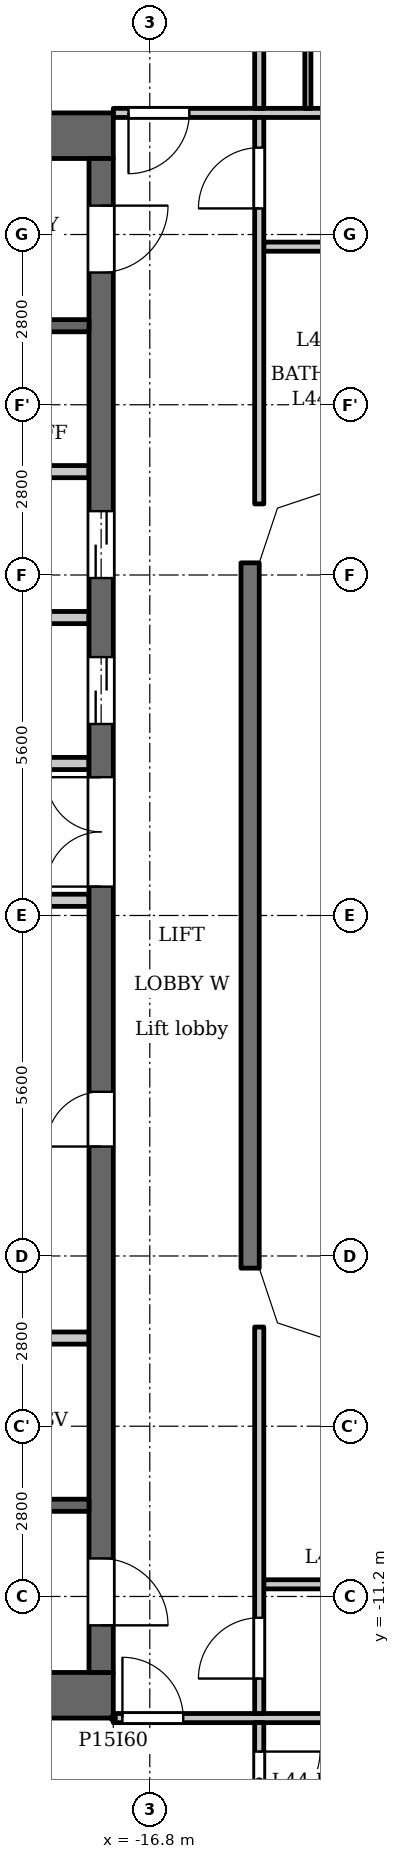
"""IFC4 building model, lengths in metres.
Left out: names, types, materials, properties, quantities, classifications, styles, units other than length and angle.
Written with IfcOpenShell. Run it as: python <this file> out.ifc"""

import sys

from ifc_helpers import new_model, si_unit, direction, frame, frame_2d, origin, place, context, subcontext, project, spatial, polyline, rectangle, outline, extrude, element, fill, save


model = new_model("IFC4")
c1 = context("Model", 3, precision=1e-05, world=origin(), true_north=direction((0.0, 1.0)))
c2 = subcontext(c1, "Body", "Model", "MODEL_VIEW")
j1 = project(units=[si_unit("LENGTHUNIT", "METRE"), si_unit("PLANEANGLEUNIT", "RADIAN")], contexts=[c1])
p1 = place(None, origin())
s1 = spatial("IfcSite", under=j1, at=p1, CompositionType="ELEMENT")
p2 = place(p1, origin())
s2 = spatial("IfcBuilding", under=s1, at=p2, CompositionType="ELEMENT")
p3 = place(p2, frame((0.0, 0.0, 171.1)))
s3 = spatial("IfcBuildingStorey", under=s2, at=p3, CompositionType="ELEMENT", Elevation=171.1)
p4 = place(p3, frame((-15.15, -5.8, 0.0), z_axis=(0.0, 0.0, 1.0), x_axis=(0.0, 1.0, 0.0)))
e1 = element("IfcWall", 1, at=p4, inside=s3, PredefinedType="SOLIDWALL", context=c2, shape_type="SweptSolid", body=[
    extrude(rectangle(XDim=11.6, YDim=0.3, at=frame_2d((5.8, 0.0))), origin(), (0.0, 0.0, 1.0), 3.2),
])
for number, where, z_axis, x_axis in (
    (2, (-17.4, 12.825, 0.0), (0.0, 0.0, 1.0), (-1.0, 0.0, 0.0)),
    (3, (-17.4, -12.825, 0.0), (0.0, 0.0, 1.0), (-1.0, 0.0, 0.0)),
):
    element("IfcWall", number, at=place(p3, frame(where, z_axis=z_axis, x_axis=x_axis)), inside=s3, PredefinedType="SHEAR", context=c2, shape_type="SweptSolid", body=[
        extrude(rectangle(XDim=10.4, YDim=0.75, at=frame_2d((5.2, 0.0))), origin(), (0.0, 0.0, 1.0), 3.2),
    ])
p5 = place(p3, frame((-17.6, -12.45, 0.0), z_axis=(0.0, 0.0, 1.0), x_axis=(0.0, 1.0, 0.0)))
e4 = element("IfcWall", 4, at=p5, inside=s3, PredefinedType="SHEAR", context=c2, shape_type="SweptSolid", body=[
    extrude(rectangle(XDim=24.9, YDim=0.4, at=frame_2d((12.45, 0.0))), origin(), (0.0, 0.0, 1.0), 3.2),
])
p6 = place(p5, frame((8.65, 0.0, 0.0)))
e5 = element("IfcOpeningElement", 5, at=p6, cuts=e4, PredefinedType="OPENING", context=c2, shape_type="SweptSolid", body=[
    extrude(rectangle(XDim=0.9, YDim=2.1, at=frame_2d((0.45, 1.05))), frame((0.0, 0.21, 0.0), z_axis=(0.0, -1.0, 0.0), x_axis=(1.0, 0.0, 0.0)), (0.0, 0.0, 1.0), 0.42),
])
p7 = place(p5, frame((15.6, 0.0, 0.0)))
e6 = element("IfcOpeningElement", 6, at=p7, cuts=e4, PredefinedType="OPENING", context=c2, shape_type="SweptSolid", body=[
    extrude(rectangle(XDim=1.1, YDim=2.1, at=frame_2d((0.55, 1.05))), frame((0.0, 0.21, 0.0), z_axis=(0.0, -1.0, 0.0), x_axis=(1.0, 0.0, 0.0)), (0.0, 0.0, 1.0), 0.42),
])
p8 = place(p5, frame((18.0, 0.0, 0.0)))
e7 = element("IfcOpeningElement", 7, at=p8, cuts=e4, PredefinedType="OPENING", context=c2, shape_type="SweptSolid", body=[
    extrude(rectangle(XDim=1.1, YDim=2.1, at=frame_2d((0.55, 1.05))), frame((0.0, 0.21, 0.0), z_axis=(0.0, -1.0, 0.0), x_axis=(1.0, 0.0, 0.0)), (0.0, 0.0, 1.0), 0.42),
])
p9 = place(p5, frame((23.025, 0.0, 0.0)))
e8 = element("IfcOpeningElement", 8, at=p9, cuts=e4, PredefinedType="OPENING", context=c2, shape_type="SweptSolid", body=[
    extrude(rectangle(XDim=1.1, YDim=2.1, at=frame_2d((0.55, 1.05))), frame((0.0, 0.21, 0.0), z_axis=(0.0, -1.0, 0.0), x_axis=(1.0, 0.0, 0.0)), (0.0, 0.0, 1.0), 0.42),
])
p10 = place(p5, frame((0.775, 0.0, 0.0)))
e9 = element("IfcOpeningElement", 9, at=p10, cuts=e4, PredefinedType="OPENING", context=c2, shape_type="SweptSolid", body=[
    extrude(rectangle(XDim=1.1, YDim=2.1, at=frame_2d((0.55, 1.05))), frame((0.0, 0.21, 0.0), z_axis=(0.0, -1.0, 0.0), x_axis=(1.0, 0.0, 0.0)), (0.0, 0.0, 1.0), 0.42),
])
p11 = place(p5, frame((12.925, 0.0, 0.0)))
e10 = element("IfcOpeningElement", 10, at=p11, cuts=e4, PredefinedType="OPENING", context=c2, shape_type="SweptSolid", body=[
    extrude(rectangle(XDim=1.8, YDim=2.1, at=frame_2d((0.9, 1.05))), frame((0.0, 0.21, 0.0), z_axis=(0.0, -1.0, 0.0), x_axis=(1.0, 0.0, 0.0)), (0.0, 0.0, 1.0), 0.42),
])
p12 = place(p3, frame((-17.8, -9.7, 0.0), z_axis=(0.0, 0.0, 1.0), x_axis=(-1.0, 0.0, 0.0)))
e11 = element("IfcWall", 11, at=p12, inside=s3, PredefinedType="SHEAR", context=c2, shape_type="SweptSolid", body=[
    extrude(rectangle(XDim=8.45, YDim=0.2, at=frame_2d((4.225, 0.0))), origin(), (0.0, 0.0, 1.0), 3.2),
])
p13 = place(p12, frame((0.85, 0.0, 0.0)))
e12 = element("IfcOpeningElement", 12, at=p13, cuts=e11, PredefinedType="OPENING", context=c2, shape_type="SweptSolid", body=[
    extrude(rectangle(XDim=1.1, YDim=2.1, at=frame_2d((0.55, 1.05))), frame((0.0, 0.11, 0.0), z_axis=(0.0, -1.0, 0.0), x_axis=(1.0, 0.0, 0.0)), (0.0, 0.0, 1.0), 0.22),
])
p14 = place(p12, frame((3.75, 0.0, 0.0)))
e13 = element("IfcOpeningElement", 13, at=p14, cuts=e11, PredefinedType="OPENING", context=c2, shape_type="SweptSolid", body=[
    extrude(rectangle(XDim=1.1, YDim=2.1, at=frame_2d((0.55, 1.05))), frame((0.0, 0.11, 0.0), z_axis=(0.0, -1.0, 0.0), x_axis=(1.0, 0.0, 0.0)), (0.0, 0.0, 1.0), 0.22),
])
p15 = place(p3, frame((-17.8, -6.95, 0.0), z_axis=(0.0, 0.0, 1.0), x_axis=(-1.0, 0.0, 0.0)))
e14 = element("IfcWall", 14, at=p15, inside=s3, PredefinedType="PARTITIONING", context=c2, shape_type="SweptSolid", body=[
    extrude(rectangle(XDim=2.8, YDim=0.2, at=frame_2d((1.4, 0.0))), origin(), (0.0, 0.0, 1.0), 3.2),
])
p16 = place(p3, frame((-17.8, 0.25, 0.0), z_axis=(0.0, 0.0, 1.0), x_axis=(-1.0, 0.0, 0.0)))
e15 = element("IfcWall", 15, at=p16, inside=s3, PredefinedType="PARTITIONING", context=c2, shape_type="SweptSolid", body=[
    extrude(rectangle(XDim=3.0, YDim=0.2, at=frame_2d((1.5, 0.0))), origin(), (0.0, 0.0, 1.0), 3.2),
])
p17 = place(p16, frame((1.98, 0.0, 0.0)))
e16 = element("IfcOpeningElement", 16, at=p17, cuts=e15, PredefinedType="OPENING", context=c2, shape_type="SweptSolid", body=[
    extrude(rectangle(XDim=0.9, YDim=2.1, at=frame_2d((0.45, 1.05))), frame((0.0, 0.11, 0.0), z_axis=(0.0, -1.0, 0.0), x_axis=(1.0, 0.0, 0.0)), (0.0, 0.0, 1.0), 0.22),
])
p18 = place(p3, frame((-17.8, 2.5, 0.0), z_axis=(0.0, 0.0, 1.0), x_axis=(-1.0, 0.0, 0.0)))
e17 = element("IfcWall", 17, at=p18, inside=s3, PredefinedType="PARTITIONING", context=c2, shape_type="SweptSolid", body=[
    extrude(rectangle(XDim=3.0, YDim=0.2, at=frame_2d((1.5, 0.0))), origin(), (0.0, 0.0, 1.0), 3.2),
])
for number, where, z_axis, x_axis in (
    (18, (-17.8, 4.9, 0.0), (0.0, 0.0, 1.0), (-1.0, 0.0, 0.0)),
    (19, (-17.8, 7.3, 0.0), (0.0, 0.0, 1.0), (-1.0, 0.0, 0.0)),
):
    element("IfcWall", number, at=place(p3, frame(where, z_axis=z_axis, x_axis=x_axis)), inside=s3, PredefinedType="PARTITIONING", context=c2, shape_type="SweptSolid", body=[
        extrude(rectangle(XDim=2.8, YDim=0.2, at=frame_2d((1.4, 0.0))), origin(), (0.0, 0.0, 1.0), 3.2),
    ])
p19 = place(p3, frame((-17.8, 9.7, 0.0), z_axis=(0.0, 0.0, 1.0), x_axis=(-1.0, 0.0, 0.0)))
e20 = element("IfcWall", 20, at=p19, inside=s3, PredefinedType="SHEAR", context=c2, shape_type="SweptSolid", body=[
    extrude(rectangle(XDim=8.45, YDim=0.2, at=frame_2d((4.225, 0.0))), origin(), (0.0, 0.0, 1.0), 3.2),
])
p20 = place(p19, frame((0.85, 0.0, 0.0)))
e21 = element("IfcOpeningElement", 21, at=p20, cuts=e20, PredefinedType="OPENING", context=c2, shape_type="SweptSolid", body=[
    extrude(rectangle(XDim=1.1, YDim=2.1, at=frame_2d((0.55, 1.05))), frame((0.0, 0.11, 0.0), z_axis=(0.0, -1.0, 0.0), x_axis=(1.0, 0.0, 0.0)), (0.0, 0.0, 1.0), 0.22),
])
p21 = place(p19, frame((3.75, 0.0, 0.0)))
e22 = element("IfcOpeningElement", 22, at=p21, cuts=e20, PredefinedType="OPENING", context=c2, shape_type="SweptSolid", body=[
    extrude(rectangle(XDim=1.1, YDim=2.1, at=frame_2d((0.55, 1.05))), frame((0.0, 0.11, 0.0), z_axis=(0.0, -1.0, 0.0), x_axis=(1.0, 0.0, 0.0)), (0.0, 0.0, 1.0), 0.22),
])
p22 = place(p3, frame((-17.4, -13.2, 0.0), z_axis=(0.0, 0.0, 1.0), x_axis=(1.0, 0.0, 0.0)))
e23 = element("IfcWall", 23, at=p22, inside=s3, PredefinedType="PARTITIONING", context=c2, shape_type="SweptSolid", body=[
    extrude(rectangle(XDim=34.8, YDim=0.15, at=frame_2d((17.4, 0.0))), origin(), (0.0, 0.0, 1.0), 3.2),
])
p23 = place(p22, frame((0.15, 0.0, 0.0)))
e24 = element("IfcOpeningElement", 24, at=p23, cuts=e23, PredefinedType="OPENING", context=c2, shape_type="SweptSolid", body=[
    extrude(rectangle(XDim=1.0, YDim=2.1, at=frame_2d((0.5, 1.05))), frame((0.0, 0.085, 0.0), z_axis=(0.0, -1.0, 0.0), x_axis=(1.0, 0.0, 0.0)), (0.0, 0.0, 1.0), 0.17),
])
p24 = place(p22, frame((33.55, 0.0, 0.0)))
e25 = element("IfcOpeningElement", 25, at=p24, cuts=e23, PredefinedType="OPENING", context=c2, shape_type="SweptSolid", body=[
    extrude(rectangle(XDim=1.0, YDim=2.1, at=frame_2d((0.5, 1.05))), frame((0.0, 0.085, 0.0), z_axis=(0.0, -1.0, 0.0), x_axis=(1.0, 0.0, 0.0)), (0.0, 0.0, 1.0), 0.17),
])
p25 = place(p22, frame((15.7, 0.0, 0.0)))
e26 = element("IfcOpeningElement", 26, at=p25, cuts=e23, PredefinedType="OPENING", context=c2, shape_type="SweptSolid", body=[
    extrude(rectangle(XDim=1.0, YDim=2.1, at=frame_2d((0.5, 1.05))), frame((0.0, 0.085, 0.0), z_axis=(0.0, -1.0, 0.0), x_axis=(1.0, 0.0, 0.0)), (0.0, 0.0, 1.0), 0.17),
])
p26 = place(p22, frame((26.9, 0.0, 0.0)))
e27 = element("IfcOpeningElement", 27, at=p26, cuts=e23, PredefinedType="OPENING", context=c2, shape_type="SweptSolid", body=[
    extrude(rectangle(XDim=1.0, YDim=2.1, at=frame_2d((0.5, 1.05))), frame((0.0, 0.085, 0.0), z_axis=(0.0, -1.0, 0.0), x_axis=(1.0, 0.0, 0.0)), (0.0, 0.0, 1.0), 0.17),
])
p27 = place(p3, frame((-14.925, -11.0, 0.0), z_axis=(0.0, 0.0, 1.0), x_axis=(1.0, 0.0, 0.0)))
e28 = element("IfcWall", 28, at=p27, inside=s3, PredefinedType="PARTITIONING", context=c2, shape_type="SweptSolid", body=[
    extrude(rectangle(XDim=29.85, YDim=0.15, at=frame_2d((14.925, 0.0))), origin(), (0.0, 0.0, 1.0), 3.2),
])
p28 = place(p27, frame((9.875, 0.0, 0.0)))
e29 = element("IfcOpeningElement", 29, at=p28, cuts=e28, PredefinedType="OPENING", context=c2, shape_type="SweptSolid", body=[
    extrude(rectangle(XDim=1.0, YDim=2.1, at=frame_2d((0.5, 1.05))), frame((0.0, 0.085, 0.0), z_axis=(0.0, -1.0, 0.0), x_axis=(1.0, 0.0, 0.0)), (0.0, 0.0, 1.0), 0.17),
])
p29 = place(p27, frame((17.875, 0.0, 0.0)))
e30 = element("IfcOpeningElement", 30, at=p29, cuts=e28, PredefinedType="OPENING", context=c2, shape_type="SweptSolid", body=[
    extrude(rectangle(XDim=1.0, YDim=2.1, at=frame_2d((0.5, 1.05))), frame((0.0, 0.085, 0.0), z_axis=(0.0, -1.0, 0.0), x_axis=(1.0, 0.0, 0.0)), (0.0, 0.0, 1.0), 0.17),
])
p30 = place(p3, frame((-14.925, 11.0, 0.0), z_axis=(0.0, 0.0, 1.0), x_axis=(1.0, 0.0, 0.0)))
e31 = element("IfcWall", 31, at=p30, inside=s3, PredefinedType="PARTITIONING", context=c2, shape_type="SweptSolid", body=[
    extrude(rectangle(XDim=29.85, YDim=0.15, at=frame_2d((14.925, 0.0))), origin(), (0.0, 0.0, 1.0), 3.2),
])
p31 = place(p30, frame((2.475, 0.0, 0.0)))
e32 = element("IfcOpeningElement", 32, at=p31, cuts=e31, PredefinedType="OPENING", context=c2, shape_type="SweptSolid", body=[
    extrude(rectangle(XDim=1.0, YDim=2.1, at=frame_2d((0.5, 1.05))), frame((0.0, 0.085, 0.0), z_axis=(0.0, -1.0, 0.0), x_axis=(1.0, 0.0, 0.0)), (0.0, 0.0, 1.0), 0.17),
])
p32 = place(p30, frame((26.275, 0.0, 0.0)))
e33 = element("IfcOpeningElement", 33, at=p32, cuts=e31, PredefinedType="OPENING", context=c2, shape_type="SweptSolid", body=[
    extrude(rectangle(XDim=1.0, YDim=2.1, at=frame_2d((0.5, 1.05))), frame((0.0, 0.085, 0.0), z_axis=(0.0, -1.0, 0.0), x_axis=(1.0, 0.0, 0.0)), (0.0, 0.0, 1.0), 0.17),
])
p33 = place(p3, frame((-17.4, 13.2, 0.0), z_axis=(0.0, 0.0, 1.0), x_axis=(1.0, 0.0, 0.0)))
e34 = element("IfcWall", 34, at=p33, inside=s3, PredefinedType="PARTITIONING", context=c2, shape_type="SweptSolid", body=[
    extrude(rectangle(XDim=34.8, YDim=0.15, at=frame_2d((17.4, 0.0))), origin(), (0.0, 0.0, 1.0), 3.2),
])
p34 = place(p33, frame((0.25, 0.0, 0.0)))
e35 = element("IfcOpeningElement", 35, at=p34, cuts=e34, PredefinedType="OPENING", context=c2, shape_type="SweptSolid", body=[
    extrude(rectangle(XDim=1.0, YDim=2.1, at=frame_2d((0.5, 1.05))), frame((0.0, 0.085, 0.0), z_axis=(0.0, -1.0, 0.0), x_axis=(1.0, 0.0, 0.0)), (0.0, 0.0, 1.0), 0.17),
])
p35 = place(p33, frame((33.65, 0.0, 0.0)))
e36 = element("IfcOpeningElement", 36, at=p35, cuts=e34, PredefinedType="OPENING", context=c2, shape_type="SweptSolid", body=[
    extrude(rectangle(XDim=1.0, YDim=2.1, at=frame_2d((0.5, 1.05))), frame((0.0, 0.085, 0.0), z_axis=(0.0, -1.0, 0.0), x_axis=(1.0, 0.0, 0.0)), (0.0, 0.0, 1.0), 0.17),
])
p36 = place(p33, frame((10.15, 0.0, 0.0)))
e37 = element("IfcOpeningElement", 37, at=p36, cuts=e34, PredefinedType="OPENING", context=c2, shape_type="SweptSolid", body=[
    extrude(rectangle(XDim=1.0, YDim=2.1, at=frame_2d((0.5, 1.05))), frame((0.0, 0.085, 0.0), z_axis=(0.0, -1.0, 0.0), x_axis=(1.0, 0.0, 0.0)), (0.0, 0.0, 1.0), 0.17),
])
p37 = place(p33, frame((15.75, 0.0, 0.0)))
e38 = element("IfcOpeningElement", 38, at=p37, cuts=e34, PredefinedType="OPENING", context=c2, shape_type="SweptSolid", body=[
    extrude(rectangle(XDim=1.0, YDim=2.1, at=frame_2d((0.5, 1.05))), frame((0.0, 0.085, 0.0), z_axis=(0.0, -1.0, 0.0), x_axis=(1.0, 0.0, 0.0)), (0.0, 0.0, 1.0), 0.17),
])
p38 = place(p33, frame((24.95, 0.0, 0.0)))
e39 = element("IfcOpeningElement", 39, at=p38, cuts=e34, PredefinedType="OPENING", context=c2, shape_type="SweptSolid", body=[
    extrude(rectangle(XDim=1.0, YDim=2.1, at=frame_2d((0.5, 1.05))), frame((0.0, 0.085, 0.0), z_axis=(0.0, -1.0, 0.0), x_axis=(1.0, 0.0, 0.0)), (0.0, 0.0, 1.0), 0.17),
])
p39 = place(p33, frame((29.95, 0.0, 0.0)))
e40 = element("IfcOpeningElement", 40, at=p39, cuts=e34, PredefinedType="OPENING", context=c2, shape_type="SweptSolid", body=[
    extrude(rectangle(XDim=1.0, YDim=2.1, at=frame_2d((0.5, 1.05))), frame((0.0, 0.085, 0.0), z_axis=(0.0, -1.0, 0.0), x_axis=(1.0, 0.0, 0.0)), (0.0, 0.0, 1.0), 0.17),
])
p40 = place(p3, frame((-15.0, -15.325, 0.0), z_axis=(0.0, 0.0, 1.0), x_axis=(0.0, 1.0, 0.0)))
e41 = element("IfcWall", 41, at=p40, inside=s3, PredefinedType="PARTITIONING", context=c2, shape_type="SweptSolid", body=[
    extrude(rectangle(XDim=2.05, YDim=0.15, at=frame_2d((1.025, 0.0))), origin(), (0.0, 0.0, 1.0), 3.2),
])
p41 = place(p40, frame((0.574, 0.0, 0.0)))
e42 = element("IfcOpeningElement", 42, at=p41, cuts=e41, PredefinedType="OPENING", context=c2, shape_type="SweptSolid", body=[
    extrude(rectangle(XDim=1.0, YDim=2.1, at=frame_2d((0.5, 1.05))), frame((0.0, 0.085, 0.0), z_axis=(0.0, -1.0, 0.0), x_axis=(1.0, 0.0, 0.0)), (0.0, 0.0, 1.0), 0.17),
])
p42 = place(p3, frame((-15.0, -13.125, 0.0), z_axis=(0.0, 0.0, 1.0), x_axis=(0.0, 1.0, 0.0)))
e43 = element("IfcWall", 43, at=p42, inside=s3, PredefinedType="PARTITIONING", context=c2, shape_type="SweptSolid", body=[
    extrude(rectangle(XDim=6.356, YDim=0.15, at=frame_2d((3.178, 0.0))), origin(), (0.0, 0.0, 1.0), 3.2),
])
p43 = place(p42, frame((0.575, 0.0, 0.0)))
e44 = element("IfcOpeningElement", 44, at=p43, cuts=e43, PredefinedType="OPENING", context=c2, shape_type="SweptSolid", body=[
    extrude(rectangle(XDim=1.0, YDim=2.1, at=frame_2d((0.5, 1.05))), frame((0.0, 0.085, 0.0), z_axis=(0.0, -1.0, 0.0), x_axis=(1.0, 0.0, 0.0)), (0.0, 0.0, 1.0), 0.17),
])
p44 = place(p3, frame((-15.0, 6.769, 0.0), z_axis=(0.0, 0.0, 1.0), x_axis=(0.0, 1.0, 0.0)))
e45 = element("IfcWall", 45, at=p44, inside=s3, PredefinedType="PARTITIONING", context=c2, shape_type="SweptSolid", body=[
    extrude(rectangle(XDim=6.356, YDim=0.15, at=frame_2d((3.178, 0.0))), origin(), (0.0, 0.0, 1.0), 3.2),
])
p45 = place(p44, frame((4.86, 0.0, 0.0)))
e46 = element("IfcOpeningElement", 46, at=p45, cuts=e45, PredefinedType="OPENING", context=c2, shape_type="SweptSolid", body=[
    extrude(rectangle(XDim=1.0, YDim=2.1, at=frame_2d((0.5, 1.05))), frame((0.0, 0.085, 0.0), z_axis=(0.0, -1.0, 0.0), x_axis=(1.0, 0.0, 0.0)), (0.0, 0.0, 1.0), 0.17),
])
p46 = place(p3, frame((-15.0, 13.275, 0.0), z_axis=(0.0, 0.0, 1.0), x_axis=(0.0, 1.0, 0.0)))
e47 = element("IfcWall", 47, at=p46, inside=s3, PredefinedType="PARTITIONING", context=c2, shape_type="SweptSolid", body=[
    extrude(rectangle(XDim=2.05, YDim=0.15, at=frame_2d((1.025, 0.0))), origin(), (0.0, 0.0, 1.0), 3.2),
])
p47 = place(p3, frame((-14.2, 13.275, 0.0), z_axis=(0.0, 0.0, 1.0), x_axis=(0.0, 1.0, 0.0)))
e48 = element("IfcWall", 48, at=p47, inside=s3, PredefinedType="PARTITIONING", context=c2, shape_type="SweptSolid", body=[
    extrude(rectangle(XDim=3.175, YDim=0.1, at=frame_2d((1.587, 0.0))), origin(), (0.0, 0.0, 1.0), 3.2),
])
p48 = place(p3, origin())
e49 = element("IfcWall", 49, at=p48, inside=s3, PredefinedType="SOLIDWALL", context=c2, shape_type="SweptSolid", body=[
    extrude(outline(polyline([(-13.849, 7.3), (-14.937, 6.937), (-15.3, 5.849), (-15.3, 5.8), (-15.0, 5.8), (-14.7, 6.7), (-13.8, 7.0), (-13.8, 7.3), (-13.849, 7.3)])), origin(), (0.0, 0.0, 1.0), 3.2),
])
e50 = element("IfcWall", 50, at=p48, inside=s3, PredefinedType="SOLIDWALL", context=c2, shape_type="SweptSolid", body=[
    extrude(outline(polyline([(-14.937, -6.937), (-13.849, -7.3), (-13.8, -7.3), (-13.8, -7.0), (-14.7, -6.7), (-15.0, -5.8), (-15.3, -5.8), (-15.3, -5.849), (-14.937, -6.937)])), origin(), (0.0, 0.0, 1.0), 3.2),
])
p49 = place(p6, origin())
e51 = element("IfcDoor", 51, at=p49, inside=s3, OperationType="SINGLE_SWING_RIGHT", PredefinedType="DOOR", context=c2, shape_type="SweptSolid", body=[
    extrude(rectangle(XDim=0.9, YDim=2.1, at=frame_2d((0.45, 1.05))), frame((0.0, 0.025, 0.0), z_axis=(0.0, -1.0, 0.0), x_axis=(1.0, 0.0, 0.0)), (0.0, 0.0, 1.0), 0.05),
])
fill(e5, e51)
p50 = place(p7, origin())
e52 = element("IfcDoor", 52, at=p50, inside=s3, OperationType="DOUBLE_DOOR_SLIDING", PredefinedType="DOOR", context=c2, shape_type="SweptSolid", body=[
    extrude(rectangle(XDim=1.1, YDim=2.1, at=frame_2d((0.55, 1.05))), frame((0.0, 0.025, 0.0), z_axis=(0.0, -1.0, 0.0), x_axis=(1.0, 0.0, 0.0)), (0.0, 0.0, 1.0), 0.05),
])
fill(e6, e52)
p51 = place(p8, origin())
e53 = element("IfcDoor", 53, at=p51, inside=s3, OperationType="DOUBLE_DOOR_SLIDING", PredefinedType="DOOR", context=c2, shape_type="SweptSolid", body=[
    extrude(rectangle(XDim=1.1, YDim=2.1, at=frame_2d((0.55, 1.05))), frame((0.0, 0.025, 0.0), z_axis=(0.0, -1.0, 0.0), x_axis=(1.0, 0.0, 0.0)), (0.0, 0.0, 1.0), 0.05),
])
fill(e7, e53)
p52 = place(p9, origin())
e54 = element("IfcDoor", 54, at=p52, inside=s3, OperationType="SINGLE_SWING_RIGHT", PredefinedType="DOOR", context=c2, shape_type="SweptSolid", body=[
    extrude(rectangle(XDim=1.1, YDim=2.1, at=frame_2d((0.55, 1.05))), frame((0.0, 0.025, 0.0), z_axis=(0.0, -1.0, 0.0), x_axis=(1.0, 0.0, 0.0)), (0.0, 0.0, 1.0), 0.05),
])
fill(e8, e54)
p53 = place(p10, origin())
e55 = element("IfcDoor", 55, at=p53, inside=s3, OperationType="SINGLE_SWING_LEFT", PredefinedType="DOOR", context=c2, shape_type="SweptSolid", body=[
    extrude(rectangle(XDim=1.1, YDim=2.1, at=frame_2d((0.55, 1.05))), frame((0.0, 0.025, 0.0), z_axis=(0.0, -1.0, 0.0), x_axis=(1.0, 0.0, 0.0)), (0.0, 0.0, 1.0), 0.05),
])
fill(e9, e55)
p54 = place(p11, origin())
e56 = element("IfcDoor", 56, at=p54, inside=s3, OperationType="DOUBLE_DOOR_SINGLE_SWING", PredefinedType="DOOR", context=c2, shape_type="SweptSolid", body=[
    extrude(rectangle(XDim=1.8, YDim=2.1, at=frame_2d((0.9, 1.05))), frame((0.0, 0.025, 0.0), z_axis=(0.0, -1.0, 0.0), x_axis=(1.0, 0.0, 0.0)), (0.0, 0.0, 1.0), 0.05),
])
fill(e10, e56)
p55 = place(p45, origin())
e57 = element("IfcDoor", 57, at=p55, inside=s3, OperationType="SINGLE_SWING_RIGHT", PredefinedType="DOOR", context=c2, shape_type="SweptSolid", body=[
    extrude(rectangle(XDim=1.0, YDim=2.1, at=frame_2d((0.5, 1.05))), frame((0.0, 0.025, 0.0), z_axis=(0.0, -1.0, 0.0), x_axis=(1.0, 0.0, 0.0)), (0.0, 0.0, 1.0), 0.05),
])
fill(e46, e57)
p56 = place(p34, origin())
e58 = element("IfcDoor", 58, at=p56, inside=s3, OperationType="SINGLE_SWING_LEFT", PredefinedType="DOOR", context=c2, shape_type="SweptSolid", body=[
    extrude(rectangle(XDim=1.0, YDim=2.1, at=frame_2d((0.5, 1.05))), frame((0.0, 0.025, 0.0), z_axis=(0.0, -1.0, 0.0), x_axis=(1.0, 0.0, 0.0)), (0.0, 0.0, 1.0), 0.05),
])
fill(e35, e58)
p57 = place(p43, origin())
e59 = element("IfcDoor", 59, at=p57, inside=s3, OperationType="SINGLE_SWING_RIGHT", PredefinedType="DOOR", context=c2, shape_type="SweptSolid", body=[
    extrude(rectangle(XDim=1.0, YDim=2.1, at=frame_2d((0.5, 1.05))), frame((0.0, 0.025, 0.0), z_axis=(0.0, -1.0, 0.0), x_axis=(1.0, 0.0, 0.0)), (0.0, 0.0, 1.0), 0.05),
])
fill(e44, e59)
p58 = place(p23, origin())
e60 = element("IfcDoor", 60, at=p58, inside=s3, OperationType="SINGLE_SWING_RIGHT", PredefinedType="DOOR", context=c2, shape_type="SweptSolid", body=[
    extrude(rectangle(XDim=1.0, YDim=2.1, at=frame_2d((0.5, 1.05))), frame((0.0, 0.025, 0.0), z_axis=(0.0, -1.0, 0.0), x_axis=(1.0, 0.0, 0.0)), (0.0, 0.0, 1.0), 0.05),
])
fill(e24, e60)
p59 = place(p41, origin())
e61 = element("IfcDoor", 61, at=p59, inside=s3, OperationType="SINGLE_SWING_RIGHT", PredefinedType="DOOR", context=c2, shape_type="SweptSolid", body=[
    extrude(rectangle(XDim=1.0, YDim=2.1, at=frame_2d((0.5, 1.05))), frame((0.0, 0.025, 0.0), z_axis=(0.0, -1.0, 0.0), x_axis=(1.0, 0.0, 0.0)), (0.0, 0.0, 1.0), 0.05),
])
fill(e42, e61)
save(model, sys.argv[1])
